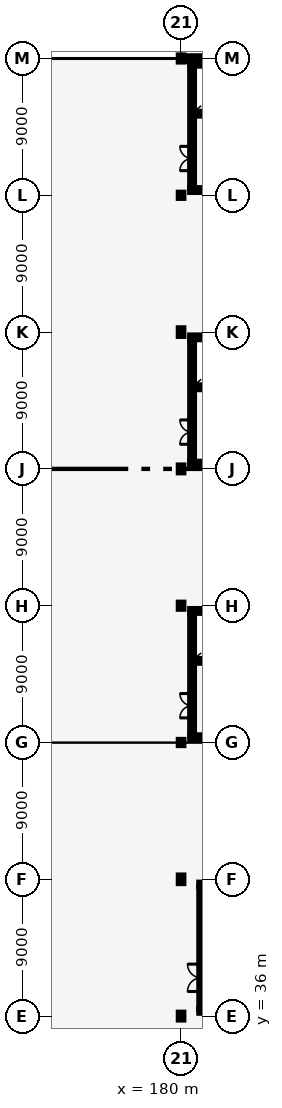
"""IFC4 building model, lengths in metres.
Left out: names, types, materials, properties, quantities, classifications, styles, units other than length and angle.
Written with IfcOpenShell. Run it as: python <this file> out.ifc"""

import sys

from ifc_helpers import new_model, si_unit, direction, frame, frame_2d, origin, origin_2d, place, context, subcontext, project, spatial, rectangle, i_section, extrude, element, fill, save


model = new_model("IFC4")
c1 = context("Model", 3, precision=1e-05, world=origin(), true_north=direction((0.0, 1.0)))
c2 = subcontext(c1, "Body", "Model", "MODEL_VIEW")
j1 = project(units=[si_unit("LENGTHUNIT", "METRE"), si_unit("PLANEANGLEUNIT", "RADIAN")], contexts=[c1])
p1 = place(None, origin())
s1 = spatial("IfcSite", under=j1, at=p1, CompositionType="ELEMENT")
p2 = place(p1, origin())
s2 = spatial("IfcBuilding", under=s1, at=p2, CompositionType="ELEMENT")
p3 = place(p2, frame((0.0, 0.0, 22.8)))
s3 = spatial("IfcBuildingStorey", under=s2, at=p3, CompositionType="ELEMENT", Elevation=22.8)
p4 = place(p3, frame((180.0, 36.0, 0.0), z_axis=(0.0, 0.0, 1.0), x_axis=(1.0, 0.0, 0.0)))
e1 = element("IfcColumn", 1, at=p4, inside=s3, PredefinedType="COLUMN", context=c2, shape_type="SweptSolid", body=[
    extrude(i_section(OverallWidth=0.3, OverallDepth=0.45, WebThickness=0.014, FlangeThickness=0.026, FilletRadius=0.027, at=origin_2d()), origin(), (0.0, 0.0, 1.0), 4.0),
])
p5 = place(p3, frame((180.0, 45.0, 0.0), z_axis=(0.0, 0.0, 1.0), x_axis=(1.0, 0.0, 0.0)))
e2 = element("IfcColumn", 2, at=p5, inside=s3, PredefinedType="COLUMN", context=c2, shape_type="SweptSolid", body=[
    extrude(i_section(OverallWidth=0.3, OverallDepth=0.5, WebThickness=0.014, FlangeThickness=0.028, FilletRadius=0.027, at=origin_2d()), origin(), (0.0, 0.0, 1.0), 4.0),
])
p6 = place(p3, frame((180.0, 54.0, 0.0), z_axis=(0.0, 0.0, 1.0), x_axis=(1.0, 0.0, 0.0)))
e3 = element("IfcColumn", 3, at=p6, inside=s3, PredefinedType="COLUMN", context=c2, shape_type="SweptSolid", body=[
    extrude(i_section(OverallWidth=0.3, OverallDepth=0.34, WebThickness=0.012, FlangeThickness=0.021, FilletRadius=0.027, at=origin_2d()), origin(), (0.0, 0.0, 1.0), 4.0),
])
p7 = place(p3, frame((180.0, 63.0, 0.0), z_axis=(0.0, 0.0, 1.0), x_axis=(1.0, 0.0, 0.0)))
e4 = element("IfcColumn", 4, at=p7, inside=s3, PredefinedType="COLUMN", context=c2, shape_type="SweptSolid", body=[
    extrude(i_section(OverallWidth=0.3, OverallDepth=0.4, WebThickness=0.013, FlangeThickness=0.024, FilletRadius=0.027, at=origin_2d()), origin(), (0.0, 0.0, 1.0), 4.0),
])
p8 = place(p3, frame((180.0, 72.0, 0.0), z_axis=(0.0, 0.0, 1.0), x_axis=(1.0, 0.0, 0.0)))
e5 = element("IfcColumn", 5, at=p8, inside=s3, PredefinedType="COLUMN", context=c2, shape_type="SweptSolid", body=[
    extrude(i_section(OverallWidth=0.3, OverallDepth=0.45, WebThickness=0.014, FlangeThickness=0.026, FilletRadius=0.027, at=origin_2d()), origin(), (0.0, 0.0, 1.0), 4.0),
])
p9 = place(p3, frame((180.0, 81.0, 0.0), z_axis=(0.0, 0.0, 1.0), x_axis=(1.0, 0.0, 0.0)))
e6 = element("IfcColumn", 6, at=p9, inside=s3, PredefinedType="COLUMN", context=c2, shape_type="SweptSolid", body=[
    extrude(i_section(OverallWidth=0.3, OverallDepth=0.5, WebThickness=0.014, FlangeThickness=0.028, FilletRadius=0.027, at=origin_2d()), origin(), (0.0, 0.0, 1.0), 4.0),
])
p10 = place(p3, frame((180.0, 90.0, 0.0), z_axis=(0.0, 0.0, 1.0), x_axis=(1.0, 0.0, 0.0)))
e7 = element("IfcColumn", 7, at=p10, inside=s3, PredefinedType="COLUMN", context=c2, shape_type="SweptSolid", body=[
    extrude(i_section(OverallWidth=0.3, OverallDepth=0.34, WebThickness=0.012, FlangeThickness=0.021, FilletRadius=0.027, at=origin_2d()), origin(), (0.0, 0.0, 1.0), 4.0),
])
p11 = place(p3, frame((180.0, 99.0, 0.0), z_axis=(0.0, 0.0, 1.0), x_axis=(1.0, 0.0, 0.0)))
e8 = element("IfcColumn", 8, at=p11, inside=s3, PredefinedType="COLUMN", context=c2, shape_type="SweptSolid", body=[
    extrude(i_section(OverallWidth=0.3, OverallDepth=0.4, WebThickness=0.013, FlangeThickness=0.024, FilletRadius=0.027, at=origin_2d()), origin(), (0.0, 0.0, 1.0), 4.0),
])
p12 = place(p3, frame((180.145, 99.0, 0.0), z_axis=(0.0, 0.0, 1.0), x_axis=(1.0, 0.0, 0.0)))
e9 = element("IfcWall", 9, at=p12, inside=s3, PredefinedType="SOLIDWALL", context=c2, shape_type="SweptSolid", body=[
    extrude(rectangle(XDim=11.71, YDim=0.29, at=frame_2d((5.855, 0.0))), origin(), (0.0, 0.0, 1.0), 2.85),
])
p13 = place(p3, frame((180.725, 54.47, 0.0), z_axis=(0.0, 0.0, 1.0), x_axis=(0.0, 1.0, 0.0)))
e10 = element("IfcWall", 10, at=p13, inside=s3, PredefinedType="SHEAR", context=c2, shape_type="SweptSolid", body=[
    extrude(rectangle(XDim=8.06, YDim=0.25, at=frame_2d((4.03, 0.0))), origin(), (0.0, 0.0, 1.0), 3.64),
])
p14 = place(p13, frame((1.15, 0.0, 0.0)))
e11 = element("IfcOpeningElement", 11, at=p14, cuts=e10, PredefinedType="OPENING", context=c2, shape_type="SweptSolid", body=[
    extrude(rectangle(XDim=1.6, YDim=2.2, at=frame_2d((0.8, 1.1))), frame((0.0, 0.135, 0.0), z_axis=(0.0, -1.0, 0.0), x_axis=(1.0, 0.0, 0.0)), (0.0, 0.0, 1.0), 0.27),
])
for number, where, z_axis, x_axis in (
    (12, (180.6, 54.345, 0.0), (0.0, 0.0, 1.0), (1.0, 0.0, 0.0)),
    (13, (180.6, 62.655, 0.0), (0.0, 0.0, 1.0), (1.0, 0.0, 0.0)),
):
    element("IfcWall", number, at=place(p3, frame(where, z_axis=z_axis, x_axis=x_axis)), inside=s3, PredefinedType="SHEAR", context=c2, shape_type="SweptSolid", body=[
        extrude(rectangle(XDim=7.8, YDim=0.25, at=frame_2d((3.9, 0.0))), origin(), (0.0, 0.0, 1.0), 3.64),
    ])
p15 = place(p3, frame((180.85, 59.37, 0.0), z_axis=(0.0, 0.0, 1.0), x_axis=(1.0, 0.0, 0.0)))
e14 = element("IfcWall", 14, at=p15, inside=s3, PredefinedType="SHEAR", context=c2, shape_type="SweptSolid", body=[
    extrude(rectangle(XDim=3.61, YDim=0.25, at=frame_2d((1.805, 0.0))), origin(), (0.0, 0.0, 1.0), 3.64),
])
p16 = place(p15, frame((0.95, 0.0, 0.0)))
e15 = element("IfcOpeningElement", 15, at=p16, cuts=e14, PredefinedType="OPENING", context=c2, shape_type="SweptSolid", body=[
    extrude(rectangle(XDim=1.2, YDim=2.2, at=frame_2d((0.6, 1.1))), frame((0.0, 0.135, 0.0), z_axis=(0.0, -1.0, 0.0), x_axis=(1.0, 0.0, 0.0)), (0.0, 0.0, 1.0), 0.27),
])
p17 = place(p3, frame((181.325, 36.47, 0.0), z_axis=(0.0, 0.0, 1.0), x_axis=(0.0, 1.0, 0.0)))
e16 = element("IfcWall", 16, at=p17, inside=s3, PredefinedType="SHEAR", context=c2, shape_type="SweptSolid", body=[
    extrude(rectangle(XDim=8.06, YDim=0.25, at=frame_2d((4.03, 0.0))), origin(), (0.0, 0.0, 1.0), 3.64),
])
p18 = place(p17, frame((1.15, 0.0, 0.0)))
e17 = element("IfcOpeningElement", 17, at=p18, cuts=e16, PredefinedType="OPENING", context=c2, shape_type="SweptSolid", body=[
    extrude(rectangle(XDim=1.8, YDim=2.2, at=frame_2d((0.9, 1.1))), frame((0.0, 0.135, 0.0), z_axis=(0.0, -1.0, 0.0), x_axis=(1.0, 0.0, 0.0)), (0.0, 0.0, 1.0), 0.27),
])
for number, where, z_axis, x_axis in (
    (18, (181.2, 36.345, 0.0), (0.0, 0.0, 1.0), (1.0, 0.0, 0.0)),
    (19, (181.2, 44.655, 0.0), (0.0, 0.0, 1.0), (1.0, 0.0, 0.0)),
):
    element("IfcWall", number, at=place(p3, frame(where, z_axis=z_axis, x_axis=x_axis)), inside=s3, PredefinedType="SHEAR", context=c2, shape_type="SweptSolid", body=[
        extrude(rectangle(XDim=7.8, YDim=0.25, at=frame_2d((3.9, 0.0))), origin(), (0.0, 0.0, 1.0), 3.64),
    ])
p19 = place(p3, frame((180.725, 72.47, 0.0), z_axis=(0.0, 0.0, 1.0), x_axis=(0.0, 1.0, 0.0)))
e20 = element("IfcWall", 20, at=p19, inside=s3, PredefinedType="SHEAR", context=c2, shape_type="SweptSolid", body=[
    extrude(rectangle(XDim=8.06, YDim=0.25, at=frame_2d((4.03, 0.0))), origin(), (0.0, 0.0, 1.0), 3.64),
])
p20 = place(p19, frame((1.15, 0.0, 0.0)))
e21 = element("IfcOpeningElement", 21, at=p20, cuts=e20, PredefinedType="OPENING", context=c2, shape_type="SweptSolid", body=[
    extrude(rectangle(XDim=1.6, YDim=2.2, at=frame_2d((0.8, 1.1))), frame((0.0, 0.135, 0.0), z_axis=(0.0, -1.0, 0.0), x_axis=(1.0, 0.0, 0.0)), (0.0, 0.0, 1.0), 0.27),
])
for number, where, z_axis, x_axis in (
    (22, (180.6, 72.345, 0.0), (0.0, 0.0, 1.0), (1.0, 0.0, 0.0)),
    (23, (180.6, 80.655, 0.0), (0.0, 0.0, 1.0), (1.0, 0.0, 0.0)),
):
    element("IfcWall", number, at=place(p3, frame(where, z_axis=z_axis, x_axis=x_axis)), inside=s3, PredefinedType="SHEAR", context=c2, shape_type="SweptSolid", body=[
        extrude(rectangle(XDim=7.8, YDim=0.25, at=frame_2d((3.9, 0.0))), origin(), (0.0, 0.0, 1.0), 3.64),
    ])
p21 = place(p3, frame((180.85, 77.37, 0.0), z_axis=(0.0, 0.0, 1.0), x_axis=(1.0, 0.0, 0.0)))
e24 = element("IfcWall", 24, at=p21, inside=s3, PredefinedType="SHEAR", context=c2, shape_type="SweptSolid", body=[
    extrude(rectangle(XDim=3.61, YDim=0.25, at=frame_2d((1.805, 0.0))), origin(), (0.0, 0.0, 1.0), 3.64),
])
p22 = place(p21, frame((0.95, 0.0, 0.0)))
e25 = element("IfcOpeningElement", 25, at=p22, cuts=e24, PredefinedType="OPENING", context=c2, shape_type="SweptSolid", body=[
    extrude(rectangle(XDim=1.2, YDim=2.2, at=frame_2d((0.6, 1.1))), frame((0.0, 0.135, 0.0), z_axis=(0.0, -1.0, 0.0), x_axis=(1.0, 0.0, 0.0)), (0.0, 0.0, 1.0), 0.27),
])
p23 = place(p3, frame((180.725, 90.47, 0.0), z_axis=(0.0, 0.0, 1.0), x_axis=(0.0, 1.0, 0.0)))
e26 = element("IfcWall", 26, at=p23, inside=s3, PredefinedType="SHEAR", context=c2, shape_type="SweptSolid", body=[
    extrude(rectangle(XDim=8.06, YDim=0.25, at=frame_2d((4.03, 0.0))), origin(), (0.0, 0.0, 1.0), 3.64),
])
p24 = place(p23, frame((1.15, 0.0, 0.0)))
e27 = element("IfcOpeningElement", 27, at=p24, cuts=e26, PredefinedType="OPENING", context=c2, shape_type="SweptSolid", body=[
    extrude(rectangle(XDim=1.6, YDim=2.2, at=frame_2d((0.8, 1.1))), frame((0.0, 0.135, 0.0), z_axis=(0.0, -1.0, 0.0), x_axis=(1.0, 0.0, 0.0)), (0.0, 0.0, 1.0), 0.27),
])
for number, where, z_axis, x_axis in (
    (28, (180.6, 90.345, 0.0), (0.0, 0.0, 1.0), (1.0, 0.0, 0.0)),
    (29, (180.6, 98.655, 0.0), (0.0, 0.0, 1.0), (1.0, 0.0, 0.0)),
):
    element("IfcWall", number, at=place(p3, frame(where, z_axis=z_axis, x_axis=x_axis)), inside=s3, PredefinedType="SHEAR", context=c2, shape_type="SweptSolid", body=[
        extrude(rectangle(XDim=7.8, YDim=0.25, at=frame_2d((3.9, 0.0))), origin(), (0.0, 0.0, 1.0), 3.64),
    ])
p25 = place(p3, frame((180.85, 95.37, 0.0), z_axis=(0.0, 0.0, 1.0), x_axis=(1.0, 0.0, 0.0)))
e30 = element("IfcWall", 30, at=p25, inside=s3, PredefinedType="SHEAR", context=c2, shape_type="SweptSolid", body=[
    extrude(rectangle(XDim=3.61, YDim=0.25, at=frame_2d((1.805, 0.0))), origin(), (0.0, 0.0, 1.0), 3.64),
])
p26 = place(p25, frame((0.95, 0.0, 0.0)))
e31 = element("IfcOpeningElement", 31, at=p26, cuts=e30, PredefinedType="OPENING", context=c2, shape_type="SweptSolid", body=[
    extrude(rectangle(XDim=1.2, YDim=2.2, at=frame_2d((0.6, 1.1))), frame((0.0, 0.135, 0.0), z_axis=(0.0, -1.0, 0.0), x_axis=(1.0, 0.0, 0.0)), (0.0, 0.0, 1.0), 0.27),
])
p27 = place(p14, origin())
e32 = element("IfcDoor", 32, at=p27, inside=s3, OperationType="DOUBLE_DOOR_SINGLE_SWING", PredefinedType="DOOR", context=c2, shape_type="SweptSolid", body=[
    extrude(rectangle(XDim=1.6, YDim=2.2, at=frame_2d((0.8, 1.1))), frame((0.0, 0.025, 0.0), z_axis=(0.0, -1.0, 0.0), x_axis=(1.0, 0.0, 0.0)), (0.0, 0.0, 1.0), 0.05),
])
fill(e11, e32)
p28 = place(p18, origin())
e33 = element("IfcDoor", 33, at=p28, inside=s3, OperationType="DOUBLE_DOOR_SINGLE_SWING", PredefinedType="DOOR", context=c2, shape_type="SweptSolid", body=[
    extrude(rectangle(XDim=1.8, YDim=2.2, at=frame_2d((0.9, 1.1))), frame((0.0, 0.025, 0.0), z_axis=(0.0, -1.0, 0.0), x_axis=(1.0, 0.0, 0.0)), (0.0, 0.0, 1.0), 0.05),
])
fill(e17, e33)
p29 = place(p20, origin())
e34 = element("IfcDoor", 34, at=p29, inside=s3, OperationType="DOUBLE_DOOR_SINGLE_SWING", PredefinedType="DOOR", context=c2, shape_type="SweptSolid", body=[
    extrude(rectangle(XDim=1.6, YDim=2.2, at=frame_2d((0.8, 1.1))), frame((0.0, 0.025, 0.0), z_axis=(0.0, -1.0, 0.0), x_axis=(1.0, 0.0, 0.0)), (0.0, 0.0, 1.0), 0.05),
])
fill(e21, e34)
p30 = place(p24, origin())
e35 = element("IfcDoor", 35, at=p30, inside=s3, OperationType="DOUBLE_DOOR_SINGLE_SWING", PredefinedType="DOOR", context=c2, shape_type="SweptSolid", body=[
    extrude(rectangle(XDim=1.6, YDim=2.2, at=frame_2d((0.8, 1.1))), frame((0.0, 0.025, 0.0), z_axis=(0.0, -1.0, 0.0), x_axis=(1.0, 0.0, 0.0)), (0.0, 0.0, 1.0), 0.05),
])
fill(e27, e35)
save(model, sys.argv[1])
